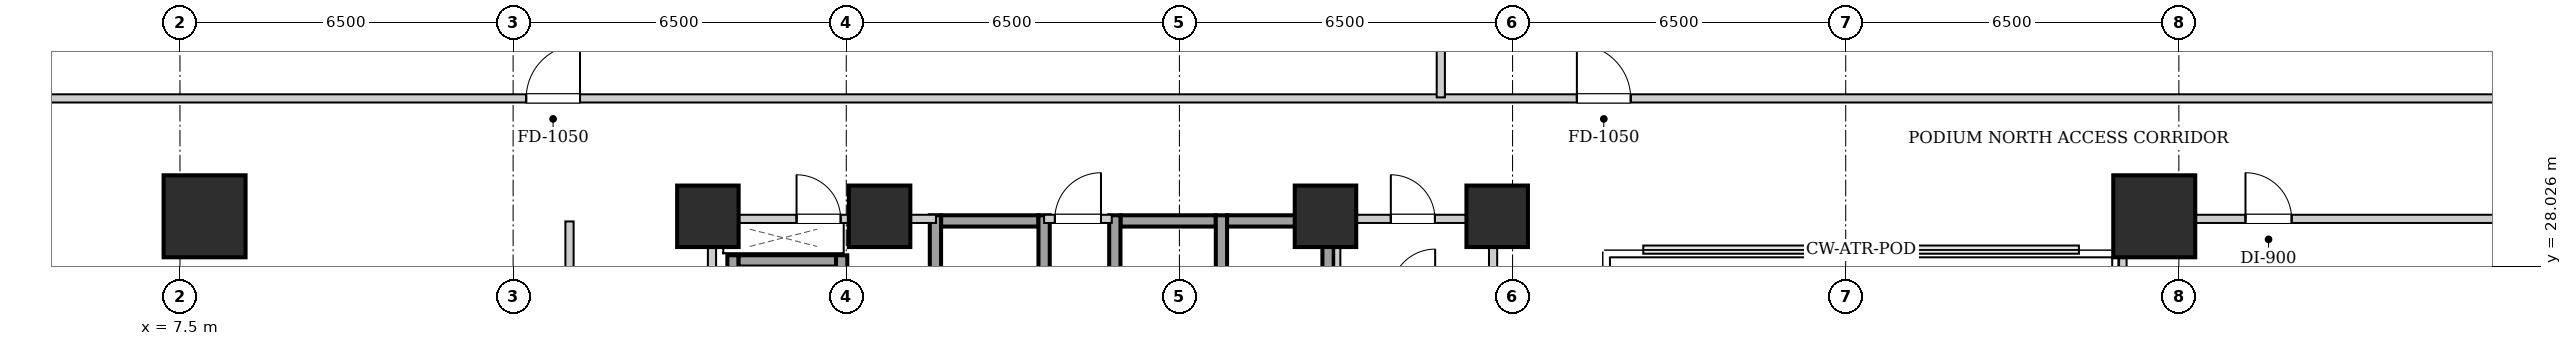
"""IFC4 building model, lengths in metres.
Left out: names, types, materials, properties, quantities, classifications, styles, units other than length and angle.
Written with IfcOpenShell. Run it as: python <this file> out.ifc"""

import sys

from ifc_helpers import new_model, si_unit, direction, frame, frame_2d, origin, origin_2d, place, context, subcontext, project, spatial, rectangle, extrude, element, fill, save


model = new_model("IFC4")
c1 = context("Model", 3, precision=1e-05, world=origin(), true_north=direction((0.0, 1.0)))
c2 = subcontext(c1, "Body", "Model", "MODEL_VIEW")
j1 = project(units=[si_unit("LENGTHUNIT", "METRE"), si_unit("PLANEANGLEUNIT", "RADIAN")], contexts=[c1])
p1 = place(None, origin())
s1 = spatial("IfcSite", under=j1, at=p1, CompositionType="ELEMENT")
p2 = place(p1, origin())
s2 = spatial("IfcBuilding", under=s1, at=p2, CompositionType="ELEMENT")
p3 = place(p2, frame((0.0, 0.0, 16.0)))
s3 = spatial("IfcBuildingStorey", under=s2, at=p3, CompositionType="ELEMENT", Elevation=16.0)
for number, where, z_axis, x_axis in (
    (1, (7.98, 29.0, 0.0), (0.0, 0.0, 1.0), (1.0, 0.0, 0.0)),
    (2, (46.02, 29.0, 0.0), (0.0, 0.0, 1.0), (1.0, 0.0, 0.0)),
):
    element("IfcColumn", number, at=place(p3, frame(where, z_axis=z_axis, x_axis=x_axis)), inside=s3, PredefinedType="COLUMN", context=c2, shape_type="SweptSolid", body=[
        extrude(rectangle(XDim=1.6, YDim=1.6, at=origin_2d()), origin(), (0.0, 0.0, 1.0), 4.8),
    ])
for number, where, z_axis, x_axis in (
    (3, (17.8, 29.0, 0.0), (0.0, 0.0, 1.0), (1.0, 0.0, 0.0)),
    (4, (21.15, 29.0, 0.0), (0.0, 0.0, 1.0), (1.0, 0.0, 0.0)),
    (5, (29.85, 29.0, 0.0), (0.0, 0.0, 1.0), (1.0, 0.0, 0.0)),
    (6, (33.2, 29.0, 0.0), (0.0, 0.0, 1.0), (1.0, 0.0, 0.0)),
):
    element("IfcColumn", number, at=place(p3, frame(where, z_axis=z_axis, x_axis=x_axis)), inside=s3, PredefinedType="COLUMN", context=c2, shape_type="SweptSolid", body=[
        extrude(rectangle(XDim=1.2, YDim=1.2, at=origin_2d()), origin(), (0.0, 0.0, 1.0), 4.8),
    ])
p4 = place(p3, frame((22.35, 28.91, 0.0), z_axis=(0.0, 0.0, 1.0), x_axis=(1.0, 0.0, 0.0)))
e7 = element("IfcWall", 7, at=p4, inside=s3, PredefinedType="SHEAR", context=c2, shape_type="SweptSolid", body=[
    extrude(rectangle(XDim=1.9, YDim=0.22, at=frame_2d((0.95, 0.0))), origin(), (0.0, 0.0, 1.0), 4.35),
])
for number, where, z_axis, x_axis in (
    (8, (22.24, 26.58, 0.0), (0.0, 0.0, 1.0), (0.0, 1.0, 0.0)),
    (9, (24.36, 26.58, 0.0), (0.0, 0.0, 1.0), (0.0, 1.0, 0.0)),
):
    element("IfcWall", number, at=place(p3, frame(where, z_axis=z_axis, x_axis=x_axis)), inside=s3, PredefinedType="SHEAR", context=c2, shape_type="SweptSolid", body=[
        extrude(rectangle(XDim=2.44, YDim=0.22, at=frame_2d((1.22, 0.0))), origin(), (0.0, 0.0, 1.0), 4.35),
    ])
p5 = place(p3, frame((25.85, 28.91, 0.0), z_axis=(0.0, 0.0, 1.0), x_axis=(1.0, 0.0, 0.0)))
e10 = element("IfcWall", 10, at=p5, inside=s3, PredefinedType="SHEAR", context=c2, shape_type="SweptSolid", body=[
    extrude(rectangle(XDim=1.86, YDim=0.22, at=frame_2d((0.93, 0.0))), origin(), (0.0, 0.0, 1.0), 4.35),
])
for number, where, z_axis, x_axis in (
    (11, (25.74, 26.58, 0.0), (0.0, 0.0, 1.0), (0.0, 1.0, 0.0)),
    (12, (27.82, 26.58, 0.0), (0.0, 0.0, 1.0), (0.0, 1.0, 0.0)),
):
    element("IfcWall", number, at=place(p3, frame(where, z_axis=z_axis, x_axis=x_axis)), inside=s3, PredefinedType="SHEAR", context=c2, shape_type="SweptSolid", body=[
        extrude(rectangle(XDim=2.44, YDim=0.22, at=frame_2d((1.22, 0.0))), origin(), (0.0, 0.0, 1.0), 4.35),
    ])
p6 = place(p3, frame((27.93, 28.91, 0.0), z_axis=(0.0, 0.0, 1.0), x_axis=(1.0, 0.0, 0.0)))
e13 = element("IfcWall", 13, at=p6, inside=s3, PredefinedType="SHEAR", context=c2, shape_type="SweptSolid", body=[
    extrude(rectangle(XDim=1.86, YDim=0.22, at=frame_2d((0.93, 0.0))), origin(), (0.0, 0.0, 1.0), 4.35),
])
p7 = place(p3, frame((29.9, 26.58, 0.0), z_axis=(0.0, 0.0, 1.0), x_axis=(0.0, 1.0, 0.0)))
e14 = element("IfcWall", 14, at=p7, inside=s3, PredefinedType="SHEAR", context=c2, shape_type="SweptSolid", body=[
    extrude(rectangle(XDim=2.44, YDim=0.22, at=frame_2d((1.22, 0.0))), origin(), (0.0, 0.0, 1.0), 4.35),
])
p8 = place(p3, frame((18.29, 24.1, 0.0), z_axis=(0.0, 0.0, 1.0), x_axis=(0.0, 1.0, 0.0)))
e15 = element("IfcWall", 15, at=p8, inside=s3, PredefinedType="SHEAR", context=c2, shape_type="SweptSolid", body=[
    extrude(rectangle(XDim=4.14, YDim=0.22, at=frame_2d((2.07, 0.0))), origin(), (0.0, 0.0, 1.0), 4.35),
])
p9 = place(p3, frame((18.4, 28.13, 0.0), z_axis=(0.0, 0.0, 1.0), x_axis=(1.0, 0.0, 0.0)))
e16 = element("IfcWall", 16, at=p9, inside=s3, PredefinedType="SHEAR", context=c2, shape_type="SweptSolid", body=[
    extrude(rectangle(XDim=1.9, YDim=0.22, at=frame_2d((0.95, 0.0))), origin(), (0.0, 0.0, 1.0), 4.35),
])
p10 = place(p3, frame((20.41, 26.06, 0.0), z_axis=(0.0, 0.0, 1.0), x_axis=(0.0, 1.0, 0.0)))
e17 = element("IfcWall", 17, at=p10, inside=s3, PredefinedType="SHEAR", context=c2, shape_type="SweptSolid", body=[
    extrude(rectangle(XDim=2.18, YDim=0.22, at=frame_2d((1.09, 0.0))), origin(), (0.0, 0.0, 1.0), 4.35),
])
for number, where, z_axis, x_axis in (
    (18, (17.88, 24.12, 0.0), (0.0, 0.0, 1.0), (0.0, 1.0, 0.0)),
    (19, (33.12, 24.12, 0.0), (0.0, 0.0, 1.0), (0.0, 1.0, 0.0)),
):
    element("IfcWall", number, at=place(p3, frame(where, z_axis=z_axis, x_axis=x_axis)), inside=s3, PredefinedType="PARTITIONING", context=c2, shape_type="SweptSolid", body=[
        extrude(rectangle(XDim=4.76, YDim=0.16, at=frame_2d((2.38, 0.0))), origin(), (0.0, 0.0, 1.0), 4.35),
    ])
p11 = place(p3, frame((24.36, 28.95, 0.0), z_axis=(0.0, 0.0, 1.0), x_axis=(1.0, 0.0, 0.0)))
e20 = element("IfcWall", 20, at=p11, inside=s3, PredefinedType="PARTITIONING", context=c2, shape_type="SweptSolid", body=[
    extrude(rectangle(XDim=1.32, YDim=0.16, at=frame_2d((0.66, 0.0))), origin(), (0.0, 0.0, 1.0), 4.35),
])
p12 = place(p11, frame((0.21, 0.0, 0.0)))
e21 = element("IfcOpeningElement", 21, at=p12, cuts=e20, PredefinedType="OPENING", context=c2, shape_type="SweptSolid", body=[
    extrude(rectangle(XDim=0.9, YDim=2.05, at=frame_2d((0.45, 1.025))), frame((0.0, 0.09, 0.0), z_axis=(0.0, -1.0, 0.0), x_axis=(1.0, 0.0, 0.0)), (0.0, 0.0, 1.0), 0.18),
])
p13 = place(p3, frame((17.96, 28.95, 0.0), z_axis=(0.0, 0.0, 1.0), x_axis=(1.0, 0.0, 0.0)))
e22 = element("IfcWall", 22, at=p13, inside=s3, PredefinedType="PARTITIONING", context=c2, shape_type="SweptSolid", body=[
    extrude(rectangle(XDim=4.29, YDim=0.16, at=frame_2d((2.145, 0.0))), origin(), (0.0, 0.0, 1.0), 4.35),
])
p14 = place(p13, frame((1.57, 0.0, 0.0)))
e23 = element("IfcOpeningElement", 23, at=p14, cuts=e22, PredefinedType="OPENING", context=c2, shape_type="SweptSolid", body=[
    extrude(rectangle(XDim=0.86, YDim=2.05, at=frame_2d((0.43, 1.025))), frame((0.0, 0.09, 0.0), z_axis=(0.0, -1.0, 0.0), x_axis=(1.0, 0.0, 0.0)), (0.0, 0.0, 1.0), 0.18),
])
p15 = place(p3, frame((30.08, 26.18, 0.0), z_axis=(0.0, 0.0, 1.0), x_axis=(0.0, 1.0, 0.0)))
e24 = element("IfcWall", 24, at=p15, inside=s3, PredefinedType="PARTITIONING", context=c2, shape_type="SweptSolid", body=[
    extrude(rectangle(XDim=2.68, YDim=0.12, at=frame_2d((1.34, 0.0))), origin(), (0.0, 0.0, 1.0), 4.35),
])
p16 = place(p3, frame((30.08, 28.95, 0.0), z_axis=(0.0, 0.0, 1.0), x_axis=(1.0, 0.0, 0.0)))
e25 = element("IfcWall", 25, at=p16, inside=s3, PredefinedType="PARTITIONING", context=c2, shape_type="SweptSolid", body=[
    extrude(rectangle(XDim=2.96, YDim=0.16, at=frame_2d((1.48, 0.0))), origin(), (0.0, 0.0, 1.0), 4.35),
])
p17 = place(p16, frame((1.045, 0.0, 0.0)))
e26 = element("IfcOpeningElement", 26, at=p17, cuts=e25, PredefinedType="OPENING", context=c2, shape_type="SweptSolid", body=[
    extrude(rectangle(XDim=0.86, YDim=2.05, at=frame_2d((0.43, 1.025))), frame((0.0, 0.09, 0.0), z_axis=(0.0, -1.0, 0.0), x_axis=(1.0, 0.0, 0.0)), (0.0, 0.0, 1.0), 0.18),
])
p18 = place(p3, frame((0.28, 31.3, 0.0), z_axis=(0.0, 0.0, 1.0), x_axis=(1.0, 0.0, 0.0)))
e27 = element("IfcWall", 27, at=p18, inside=s3, PredefinedType="PARTITIONING", context=c2, shape_type="SweptSolid", body=[
    extrude(rectangle(XDim=53.44, YDim=0.16, at=frame_2d((26.72, 0.0))), origin(), (0.0, 0.0, 1.0), 4.35),
])
p19 = place(p18, frame((13.975, 0.0, 0.0)))
e28 = element("IfcOpeningElement", 28, at=p19, cuts=e27, PredefinedType="OPENING", context=c2, shape_type="SweptSolid", body=[
    extrude(rectangle(XDim=1.05, YDim=2.05, at=frame_2d((0.525, 1.025))), frame((0.0, 0.09, 0.0), z_axis=(0.0, -1.0, 0.0), x_axis=(1.0, 0.0, 0.0)), (0.0, 0.0, 1.0), 0.18),
])
p20 = place(p18, frame((34.475, 0.0, 0.0)))
e29 = element("IfcOpeningElement", 29, at=p20, cuts=e27, PredefinedType="OPENING", context=c2, shape_type="SweptSolid", body=[
    extrude(rectangle(XDim=1.05, YDim=2.05, at=frame_2d((0.525, 1.025))), frame((0.0, 0.09, 0.0), z_axis=(0.0, -1.0, 0.0), x_axis=(1.0, 0.0, 0.0)), (0.0, 0.0, 1.0), 0.18),
])
p21 = place(p3, frame((15.1, 15.1, 0.0), z_axis=(0.0, 0.0, 1.0), x_axis=(0.0, 1.0, 0.0)))
e30 = element("IfcWall", 30, at=p21, inside=s3, PredefinedType="PARTITIONING", context=c2, shape_type="SweptSolid", body=[
    extrude(rectangle(XDim=13.8, YDim=0.16, at=frame_2d((6.9, 0.0))), origin(), (0.0, 0.0, 1.0), 4.35),
])
p22 = place(p21, frame((6.475, 0.0, 0.0)))
e31 = element("IfcOpeningElement", 31, at=p22, cuts=e30, PredefinedType="OPENING", context=c2, shape_type="SweptSolid", body=[
    extrude(rectangle(XDim=1.05, YDim=2.05, at=frame_2d((0.525, 1.025))), frame((0.0, 0.09, 0.0), z_axis=(0.0, -1.0, 0.0), x_axis=(1.0, 0.0, 0.0)), (0.0, 0.0, 1.0), 0.18),
])
p23 = place(p3, frame((45.4, 28.95, 0.0), z_axis=(0.0, 0.0, 1.0), x_axis=(1.0, 0.0, 0.0)))
e32 = element("IfcWall", 32, at=p23, inside=s3, PredefinedType="PARTITIONING", context=c2, shape_type="SweptSolid", body=[
    extrude(rectangle(XDim=8.32, YDim=0.16, at=frame_2d((4.16, 0.0))), origin(), (0.0, 0.0, 1.0), 3.435),
])
p24 = place(p23, frame((2.4, 0.0, 0.0)))
e33 = element("IfcOpeningElement", 33, at=p24, cuts=e32, PredefinedType="OPENING", context=c2, shape_type="SweptSolid", body=[
    extrude(rectangle(XDim=0.9, YDim=2.05, at=frame_2d((0.45, 1.025))), frame((0.0, 0.09, 0.0), z_axis=(0.0, -1.0, 0.0), x_axis=(1.0, 0.0, 0.0)), (0.0, 0.0, 1.0), 0.18),
])
p25 = place(p3, frame((45.4, 15.1, 0.0), z_axis=(0.0, 0.0, 1.0), x_axis=(0.0, 1.0, 0.0)))
e34 = element("IfcWall", 34, at=p25, inside=s3, PredefinedType="PARTITIONING", context=c2, shape_type="SweptSolid", body=[
    extrude(rectangle(XDim=13.78, YDim=0.16, at=frame_2d((6.89, 0.0))), origin(), (0.0, 0.0, 1.0), 4.35),
])
p26 = place(p3, frame((32.1, 31.32, 0.0), z_axis=(0.0, 0.0, 1.0), x_axis=(0.0, 1.0, 0.0)))
e35 = element("IfcWall", 35, at=p26, inside=s3, PredefinedType="PARTITIONING", context=c2, shape_type="SweptSolid", body=[
    extrude(rectangle(XDim=16.0, YDim=0.16, at=frame_2d((8.0, 0.0))), origin(), (0.0, 0.0, 1.0), 4.35),
])
p27 = place(p26, frame((4.55, 0.0, 0.0)))
e36 = element("IfcOpeningElement", 36, at=p27, cuts=e35, PredefinedType="OPENING", context=c2, shape_type="SweptSolid", body=[
    extrude(rectangle(XDim=0.9, YDim=2.05, at=frame_2d((0.45, 1.025))), frame((0.0, 0.09, 0.0), z_axis=(0.0, -1.0, 0.0), x_axis=(1.0, 0.0, 0.0)), (0.0, 0.0, 1.0), 0.18),
])
p28 = place(p12, origin())
e37 = element("IfcDoor", 37, at=p28, inside=s3, OperationType="SINGLE_SWING_RIGHT", PredefinedType="DOOR", context=c2, shape_type="SweptSolid", body=[
    extrude(rectangle(XDim=0.9, YDim=2.05, at=frame_2d((0.45, 1.025))), frame((0.0, 0.025, 0.0), z_axis=(0.0, -1.0, 0.0), x_axis=(1.0, 0.0, 0.0)), (0.0, 0.0, 1.0), 0.05),
])
fill(e21, e37)
p29 = place(p14, origin())
e38 = element("IfcDoor", 38, at=p29, inside=s3, OperationType="SINGLE_SWING_LEFT", PredefinedType="DOOR", context=c2, shape_type="SweptSolid", body=[
    extrude(rectangle(XDim=0.86, YDim=2.05, at=frame_2d((0.43, 1.025))), frame((0.0, 0.025, 0.0), z_axis=(0.0, -1.0, 0.0), x_axis=(1.0, 0.0, 0.0)), (0.0, 0.0, 1.0), 0.05),
])
fill(e23, e38)
p30 = place(p17, origin())
e39 = element("IfcDoor", 39, at=p30, inside=s3, OperationType="SINGLE_SWING_LEFT", PredefinedType="DOOR", context=c2, shape_type="SweptSolid", body=[
    extrude(rectangle(XDim=0.86, YDim=2.05, at=frame_2d((0.43, 1.025))), frame((0.0, 0.025, 0.0), z_axis=(0.0, -1.0, 0.0), x_axis=(1.0, 0.0, 0.0)), (0.0, 0.0, 1.0), 0.05),
])
fill(e26, e39)
p31 = place(p19, origin())
e40 = element("IfcDoor", 40, at=p31, inside=s3, OperationType="SINGLE_SWING_RIGHT", PredefinedType="DOOR", context=c2, shape_type="SweptSolid", body=[
    extrude(rectangle(XDim=1.05, YDim=2.05, at=frame_2d((0.525, 1.025))), frame((0.0, 0.025, 0.0), z_axis=(0.0, -1.0, 0.0), x_axis=(1.0, 0.0, 0.0)), (0.0, 0.0, 1.0), 0.05),
])
fill(e28, e40)
p32 = place(p20, origin())
e41 = element("IfcDoor", 41, at=p32, inside=s3, OperationType="SINGLE_SWING_LEFT", PredefinedType="DOOR", context=c2, shape_type="SweptSolid", body=[
    extrude(rectangle(XDim=1.05, YDim=2.05, at=frame_2d((0.525, 1.025))), frame((0.0, 0.025, 0.0), z_axis=(0.0, -1.0, 0.0), x_axis=(1.0, 0.0, 0.0)), (0.0, 0.0, 1.0), 0.05),
])
fill(e29, e41)
p33 = place(p24, origin())
e42 = element("IfcDoor", 42, at=p33, inside=s3, OperationType="SINGLE_SWING_LEFT", PredefinedType="DOOR", context=c2, shape_type="SweptSolid", body=[
    extrude(rectangle(XDim=0.9, YDim=2.05, at=frame_2d((0.45, 1.025))), frame((0.0, 0.025, 0.0), z_axis=(0.0, -1.0, 0.0), x_axis=(1.0, 0.0, 0.0)), (0.0, 0.0, 1.0), 0.05),
])
fill(e33, e42)
save(model, sys.argv[1])
